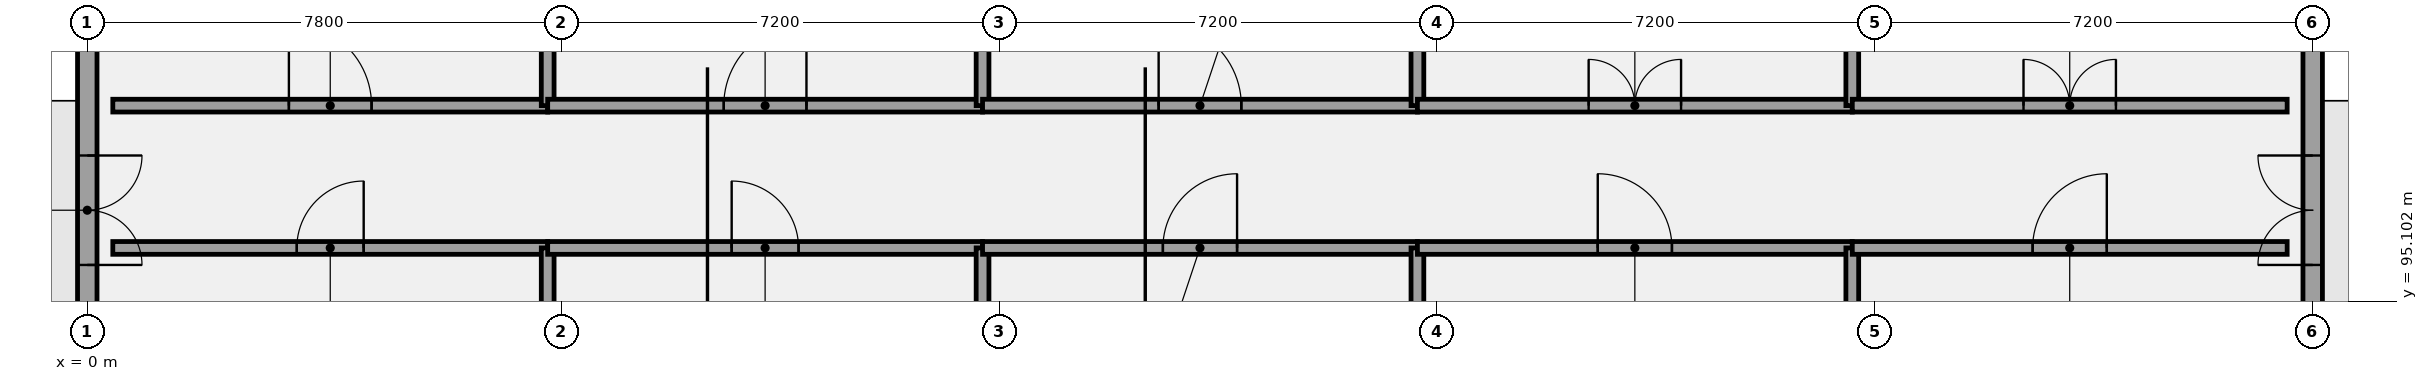
"""IFC4 building model, lengths in metres.
Left out: names, types, materials, properties, quantities, classifications, styles, units other than length and angle.
Written with IfcOpenShell. Run it as: python <this file> out.ifc"""

import sys

from ifc_helpers import new_model, si_unit, direction, frame, frame_2d, origin, place, context, subcontext, project, spatial, rectangle, extrude, element, fill, save


model = new_model("IFC4")
c1 = context("Model", 3, precision=1e-05, world=origin(), true_north=direction((0.0, 1.0)))
c2 = subcontext(c1, "Body", "Model", "MODEL_VIEW")
j1 = project(units=[si_unit("LENGTHUNIT", "METRE"), si_unit("PLANEANGLEUNIT", "RADIAN")], contexts=[c1])
p1 = place(None, origin())
s1 = spatial("IfcSite", under=j1, at=p1, CompositionType="ELEMENT")
p2 = place(p1, origin())
s2 = spatial("IfcBuilding", under=s1, at=p2, CompositionType="ELEMENT")
p3 = place(p2, origin())
s3 = spatial("IfcBuildingStorey", under=s2, at=p3, CompositionType="ELEMENT", Elevation=0.0)
p4 = place(p3, frame((36.6, 85.96, 0.0), z_axis=(0.0, 0.0, 1.0), x_axis=(0.0, 1.0, 0.0)))
e1 = element("IfcWall", 1, at=p4, inside=s3, PredefinedType="SOLIDWALL", context=c2, shape_type="SweptSolid", body=[
    extrude(rectangle(XDim=21.28, YDim=0.32, at=frame_2d((10.64, 0.0))), origin(), (0.0, 0.0, 1.0), 4.27),
])
p5 = place(p4, frame((9.74, 0.0, 0.0)))
e2 = element("IfcOpeningElement", 2, at=p5, cuts=e1, PredefinedType="OPENING", context=c2, shape_type="SweptSolid", body=[
    extrude(rectangle(XDim=1.8, YDim=2.4, at=frame_2d((0.9, 1.2))), frame((0.0, 0.17, 0.0), z_axis=(0.0, -1.0, 0.0), x_axis=(1.0, 0.0, 0.0)), (0.0, 0.0, 1.0), 0.34),
])
p6 = place(p4, frame((2.945, 0.0, 1.0)))
e3 = element("IfcOpeningElement", 3, at=p6, cuts=e1, PredefinedType="OPENING", context=c2, shape_type="SweptSolid", body=[
    extrude(rectangle(XDim=1.15, YDim=1.65, at=frame_2d((0.575, 0.825))), frame((0.0, 0.17, 0.0), z_axis=(0.0, -1.0, 0.0), x_axis=(1.0, 0.0, 0.0)), (0.0, 0.0, 1.0), 0.34),
])
p7 = place(p4, frame((17.185, 0.0, 1.0)))
e4 = element("IfcOpeningElement", 4, at=p7, cuts=e1, PredefinedType="OPENING", context=c2, shape_type="SweptSolid", body=[
    extrude(rectangle(XDim=1.15, YDim=1.65, at=frame_2d((0.575, 0.825))), frame((0.0, 0.17, 0.0), z_axis=(0.0, -1.0, 0.0), x_axis=(1.0, 0.0, 0.0)), (0.0, 0.0, 1.0), 0.34),
])
p8 = place(p3, frame((0.0, 107.24, 0.0), z_axis=(0.0, 0.0, 1.0), x_axis=(0.0, -1.0, 0.0)))
e5 = element("IfcWall", 5, at=p8, inside=s3, PredefinedType="SOLIDWALL", context=c2, shape_type="SweptSolid", body=[
    extrude(rectangle(XDim=21.28, YDim=0.32, at=frame_2d((10.64, 0.0))), origin(), (0.0, 0.0, 1.0), 4.37),
])
p9 = place(p8, frame((9.74, 0.0, 0.0)))
e6 = element("IfcOpeningElement", 6, at=p9, cuts=e5, PredefinedType="OPENING", context=c2, shape_type="SweptSolid", body=[
    extrude(rectangle(XDim=1.8, YDim=2.4, at=frame_2d((0.9, 1.2))), frame((0.0, 0.17, 0.0), z_axis=(0.0, -1.0, 0.0), x_axis=(1.0, 0.0, 0.0)), (0.0, 0.0, 1.0), 0.34),
])
p10 = place(p8, frame((17.185, 0.0, 1.0)))
e7 = element("IfcOpeningElement", 7, at=p10, cuts=e5, PredefinedType="OPENING", context=c2, shape_type="SweptSolid", body=[
    extrude(rectangle(XDim=1.15, YDim=2.15, at=frame_2d((0.575, 1.075))), frame((0.0, 0.17, 0.0), z_axis=(0.0, -1.0, 0.0), x_axis=(1.0, 0.0, 0.0)), (0.0, 0.0, 1.0), 0.34),
])
p11 = place(p8, frame((2.945, 0.0, 1.0)))
e8 = element("IfcOpeningElement", 8, at=p11, cuts=e5, PredefinedType="OPENING", context=c2, shape_type="SweptSolid", body=[
    extrude(rectangle(XDim=1.15, YDim=2.15, at=frame_2d((0.575, 1.075))), frame((0.0, 0.17, 0.0), z_axis=(0.0, -1.0, 0.0), x_axis=(1.0, 0.0, 0.0)), (0.0, 0.0, 1.0), 0.34),
])
p12 = place(p3, frame((0.42, 95.98, 0.0), z_axis=(0.0, 0.0, 1.0), x_axis=(1.0, 0.0, 0.0)))
e9 = element("IfcWall", 9, at=p12, inside=s3, PredefinedType="PARTITIONING", context=c2, shape_type="SweptSolid", body=[
    extrude(rectangle(XDim=7.152, YDim=0.21, at=frame_2d((3.576, 0.0))), origin(), (0.0, 0.0, 1.0), 5.12),
])
p13 = place(p12, frame((3.026, 0.0, 0.0)))
e10 = element("IfcOpeningElement", 10, at=p13, cuts=e9, PredefinedType="OPENING", context=c2, shape_type="SweptSolid", body=[
    extrude(rectangle(XDim=1.1, YDim=2.22, at=frame_2d((0.55, 1.11))), frame((0.0, 0.115, 0.0), z_axis=(0.0, -1.0, 0.0), x_axis=(1.0, 0.0, 0.0)), (0.0, 0.0, 1.0), 0.23),
])
p14 = place(p3, frame((7.572, 85.98, 0.0), z_axis=(0.0, 0.0, 1.0), x_axis=(0.0, 1.0, 0.0)))
e11 = element("IfcWall", 11, at=p14, inside=s3, PredefinedType="PARTITIONING", context=c2, shape_type="SweptSolid", body=[
    extrude(rectangle(XDim=10.0, YDim=0.21, at=frame_2d((5.0, 0.0))), origin(), (0.0, 0.0, 1.0), 4.52),
])
p15 = place(p3, frame((7.572, 95.98, 0.0), z_axis=(0.0, 0.0, 1.0), x_axis=(1.0, 0.0, 0.0)))
e12 = element("IfcWall", 12, at=p15, inside=s3, PredefinedType="PARTITIONING", context=c2, shape_type="SweptSolid", body=[
    extrude(rectangle(XDim=7.152, YDim=0.21, at=frame_2d((3.576, 0.0))), origin(), (0.0, 0.0, 1.0), 5.12),
])
p16 = place(p15, frame((3.026, 0.0, 0.0)))
e13 = element("IfcOpeningElement", 13, at=p16, cuts=e12, PredefinedType="OPENING", context=c2, shape_type="SweptSolid", body=[
    extrude(rectangle(XDim=1.1, YDim=2.35, at=frame_2d((0.55, 1.175))), frame((0.0, 0.115, 0.0), z_axis=(0.0, -1.0, 0.0), x_axis=(1.0, 0.0, 0.0)), (0.0, 0.0, 1.0), 0.23),
])
p17 = place(p3, frame((14.724, 85.98, 0.0), z_axis=(0.0, 0.0, 1.0), x_axis=(0.0, 1.0, 0.0)))
e14 = element("IfcWall", 14, at=p17, inside=s3, PredefinedType="PARTITIONING", context=c2, shape_type="SweptSolid", body=[
    extrude(rectangle(XDim=10.0, YDim=0.21, at=frame_2d((5.0, 0.0))), origin(), (0.0, 0.0, 1.0), 4.47),
])
p18 = place(p3, frame((14.724, 95.98, 0.0), z_axis=(0.0, 0.0, 1.0), x_axis=(1.0, 0.0, 0.0)))
e15 = element("IfcWall", 15, at=p18, inside=s3, PredefinedType="PARTITIONING", context=c2, shape_type="SweptSolid", body=[
    extrude(rectangle(XDim=7.152, YDim=0.21, at=frame_2d((3.576, 0.0))), origin(), (0.0, 0.0, 1.0), 5.12),
])
p19 = place(p18, frame((2.966, 0.0, 0.0)))
e16 = element("IfcOpeningElement", 16, at=p19, cuts=e15, PredefinedType="OPENING", context=c2, shape_type="SweptSolid", body=[
    extrude(rectangle(XDim=1.22, YDim=2.1, at=frame_2d((0.61, 1.05))), frame((0.0, 0.115, 0.0), z_axis=(0.0, -1.0, 0.0), x_axis=(1.0, 0.0, 0.0)), (0.0, 0.0, 1.0), 0.23),
])
p20 = place(p3, frame((21.876, 85.98, 0.0), z_axis=(0.0, 0.0, 1.0), x_axis=(0.0, 1.0, 0.0)))
e17 = element("IfcWall", 17, at=p20, inside=s3, PredefinedType="PARTITIONING", context=c2, shape_type="SweptSolid", body=[
    extrude(rectangle(XDim=10.0, YDim=0.21, at=frame_2d((5.0, 0.0))), origin(), (0.0, 0.0, 1.0), 4.37),
])
p21 = place(p3, frame((21.876, 95.98, 0.0), z_axis=(0.0, 0.0, 1.0), x_axis=(1.0, 0.0, 0.0)))
e18 = element("IfcWall", 18, at=p21, inside=s3, PredefinedType="PARTITIONING", context=c2, shape_type="SweptSolid", body=[
    extrude(rectangle(XDim=7.152, YDim=0.21, at=frame_2d((3.576, 0.0))), origin(), (0.0, 0.0, 1.0), 5.12),
])
p22 = place(p21, frame((2.966, 0.0, 0.0)))
e19 = element("IfcOpeningElement", 19, at=p22, cuts=e18, PredefinedType="OPENING", context=c2, shape_type="SweptSolid", body=[
    extrude(rectangle(XDim=1.22, YDim=2.22, at=frame_2d((0.61, 1.11))), frame((0.0, 0.115, 0.0), z_axis=(0.0, -1.0, 0.0), x_axis=(1.0, 0.0, 0.0)), (0.0, 0.0, 1.0), 0.23),
])
p23 = place(p3, frame((29.028, 85.98, 0.0), z_axis=(0.0, 0.0, 1.0), x_axis=(0.0, 1.0, 0.0)))
e20 = element("IfcWall", 20, at=p23, inside=s3, PredefinedType="PARTITIONING", context=c2, shape_type="SweptSolid", body=[
    extrude(rectangle(XDim=10.0, YDim=0.21, at=frame_2d((5.0, 0.0))), origin(), (0.0, 0.0, 1.0), 4.42),
])
p24 = place(p3, frame((29.028, 95.98, 0.0), z_axis=(0.0, 0.0, 1.0), x_axis=(1.0, 0.0, 0.0)))
e21 = element("IfcWall", 21, at=p24, inside=s3, PredefinedType="PARTITIONING", context=c2, shape_type="SweptSolid", body=[
    extrude(rectangle(XDim=7.152, YDim=0.21, at=frame_2d((3.576, 0.0))), origin(), (0.0, 0.0, 1.0), 5.12),
])
p25 = place(p24, frame((2.966, 0.0, 0.0)))
e22 = element("IfcOpeningElement", 22, at=p25, cuts=e21, PredefinedType="OPENING", context=c2, shape_type="SweptSolid", body=[
    extrude(rectangle(XDim=1.22, YDim=2.35, at=frame_2d((0.61, 1.175))), frame((0.0, 0.115, 0.0), z_axis=(0.0, -1.0, 0.0), x_axis=(1.0, 0.0, 0.0)), (0.0, 0.0, 1.0), 0.23),
])
p26 = place(p3, frame((0.42, 98.32, 0.0), z_axis=(0.0, 0.0, 1.0), x_axis=(1.0, 0.0, 0.0)))
e23 = element("IfcWall", 23, at=p26, inside=s3, PredefinedType="PARTITIONING", context=c2, shape_type="SweptSolid", body=[
    extrude(rectangle(XDim=7.152, YDim=0.21, at=frame_2d((3.576, 0.0))), origin(), (0.0, 0.0, 1.0), 4.57),
])
p27 = place(p26, frame((2.896, 0.0, 0.0)))
e24 = element("IfcOpeningElement", 24, at=p27, cuts=e23, PredefinedType="OPENING", context=c2, shape_type="SweptSolid", body=[
    extrude(rectangle(XDim=1.36, YDim=2.1, at=frame_2d((0.68, 1.05))), frame((0.0, 0.115, 0.0), z_axis=(0.0, -1.0, 0.0), x_axis=(1.0, 0.0, 0.0)), (0.0, 0.0, 1.0), 0.23),
])
p28 = place(p3, frame((7.572, 98.32, 0.0), z_axis=(0.0, 0.0, 1.0), x_axis=(0.0, 1.0, 0.0)))
e25 = element("IfcWall", 25, at=p28, inside=s3, PredefinedType="PARTITIONING", context=c2, shape_type="SweptSolid", body=[
    extrude(rectangle(XDim=8.9, YDim=0.21, at=frame_2d((4.45, 0.0))), origin(), (0.0, 0.0, 1.0), 4.47),
])
p29 = place(p3, frame((7.572, 98.32, 0.0), z_axis=(0.0, 0.0, 1.0), x_axis=(1.0, 0.0, 0.0)))
e26 = element("IfcWall", 26, at=p29, inside=s3, PredefinedType="PARTITIONING", context=c2, shape_type="SweptSolid", body=[
    extrude(rectangle(XDim=7.152, YDim=0.21, at=frame_2d((3.576, 0.0))), origin(), (0.0, 0.0, 1.0), 4.57),
])
p30 = place(p29, frame((2.896, 0.0, 0.0)))
e27 = element("IfcOpeningElement", 27, at=p30, cuts=e26, PredefinedType="OPENING", context=c2, shape_type="SweptSolid", body=[
    extrude(rectangle(XDim=1.36, YDim=2.22, at=frame_2d((0.68, 1.11))), frame((0.0, 0.115, 0.0), z_axis=(0.0, -1.0, 0.0), x_axis=(1.0, 0.0, 0.0)), (0.0, 0.0, 1.0), 0.23),
])
p31 = place(p3, frame((14.724, 98.32, 0.0), z_axis=(0.0, 0.0, 1.0), x_axis=(0.0, 1.0, 0.0)))
e28 = element("IfcWall", 28, at=p31, inside=s3, PredefinedType="PARTITIONING", context=c2, shape_type="SweptSolid", body=[
    extrude(rectangle(XDim=8.9, YDim=0.21, at=frame_2d((4.45, 0.0))), origin(), (0.0, 0.0, 1.0), 4.37),
])
p32 = place(p3, frame((14.724, 98.32, 0.0), z_axis=(0.0, 0.0, 1.0), x_axis=(1.0, 0.0, 0.0)))
e29 = element("IfcWall", 29, at=p32, inside=s3, PredefinedType="PARTITIONING", context=c2, shape_type="SweptSolid", body=[
    extrude(rectangle(XDim=7.152, YDim=0.21, at=frame_2d((3.576, 0.0))), origin(), (0.0, 0.0, 1.0), 4.57),
])
p33 = place(p32, frame((2.896, 0.0, 0.0)))
e30 = element("IfcOpeningElement", 30, at=p33, cuts=e29, PredefinedType="OPENING", context=c2, shape_type="SweptSolid", body=[
    extrude(rectangle(XDim=1.36, YDim=2.35, at=frame_2d((0.68, 1.175))), frame((0.0, 0.115, 0.0), z_axis=(0.0, -1.0, 0.0), x_axis=(1.0, 0.0, 0.0)), (0.0, 0.0, 1.0), 0.23),
])
p34 = place(p3, frame((21.876, 98.32, 0.0), z_axis=(0.0, 0.0, 1.0), x_axis=(0.0, 1.0, 0.0)))
e31 = element("IfcWall", 31, at=p34, inside=s3, PredefinedType="PARTITIONING", context=c2, shape_type="SweptSolid", body=[
    extrude(rectangle(XDim=8.9, YDim=0.21, at=frame_2d((4.45, 0.0))), origin(), (0.0, 0.0, 1.0), 4.37),
])
p35 = place(p3, frame((21.876, 98.32, 0.0), z_axis=(0.0, 0.0, 1.0), x_axis=(1.0, 0.0, 0.0)))
e32 = element("IfcWall", 32, at=p35, inside=s3, PredefinedType="PARTITIONING", context=c2, shape_type="SweptSolid", body=[
    extrude(rectangle(XDim=7.152, YDim=0.21, at=frame_2d((3.576, 0.0))), origin(), (0.0, 0.0, 1.0), 4.57),
])
p36 = place(p35, frame((2.816, 0.0, 0.0)))
e33 = element("IfcOpeningElement", 33, at=p36, cuts=e32, PredefinedType="OPENING", context=c2, shape_type="SweptSolid", body=[
    extrude(rectangle(XDim=1.52, YDim=2.1, at=frame_2d((0.76, 1.05))), frame((0.0, 0.115, 0.0), z_axis=(0.0, -1.0, 0.0), x_axis=(1.0, 0.0, 0.0)), (0.0, 0.0, 1.0), 0.23),
])
p37 = place(p3, frame((29.028, 98.32, 0.0), z_axis=(0.0, 0.0, 1.0), x_axis=(0.0, 1.0, 0.0)))
e34 = element("IfcWall", 34, at=p37, inside=s3, PredefinedType="PARTITIONING", context=c2, shape_type="SweptSolid", body=[
    extrude(rectangle(XDim=8.9, YDim=0.21, at=frame_2d((4.45, 0.0))), origin(), (0.0, 0.0, 1.0), 4.32),
])
p38 = place(p3, frame((29.028, 98.32, 0.0), z_axis=(0.0, 0.0, 1.0), x_axis=(1.0, 0.0, 0.0)))
e35 = element("IfcWall", 35, at=p38, inside=s3, PredefinedType="PARTITIONING", context=c2, shape_type="SweptSolid", body=[
    extrude(rectangle(XDim=7.152, YDim=0.21, at=frame_2d((3.576, 0.0))), origin(), (0.0, 0.0, 1.0), 4.57),
])
p39 = place(p38, frame((2.816, 0.0, 0.0)))
e36 = element("IfcOpeningElement", 36, at=p39, cuts=e35, PredefinedType="OPENING", context=c2, shape_type="SweptSolid", body=[
    extrude(rectangle(XDim=1.52, YDim=2.22, at=frame_2d((0.76, 1.11))), frame((0.0, 0.115, 0.0), z_axis=(0.0, -1.0, 0.0), x_axis=(1.0, 0.0, 0.0)), (0.0, 0.0, 1.0), 0.23),
])
p40 = place(p5, frame((1.8, 0.0, 0.0), z_axis=(0.0, 0.0, 1.0), x_axis=(-1.0, 0.0, 0.0)))
e37 = element("IfcDoor", 37, at=p40, inside=s3, OperationType="DOUBLE_DOOR_SINGLE_SWING", PredefinedType="DOOR", context=c2, shape_type="SweptSolid", body=[
    extrude(rectangle(XDim=1.8, YDim=2.4, at=frame_2d((0.9, 1.2))), frame((0.0, 0.025, 0.0), z_axis=(0.0, -1.0, 0.0), x_axis=(1.0, 0.0, 0.0)), (0.0, 0.0, 1.0), 0.05),
])
fill(e2, e37)
p41 = place(p9, frame((1.8, 0.0, 0.0), z_axis=(0.0, 0.0, 1.0), x_axis=(-1.0, 0.0, 0.0)))
e38 = element("IfcDoor", 38, at=p41, inside=s3, OperationType="DOUBLE_DOOR_SINGLE_SWING", PredefinedType="DOOR", context=c2, shape_type="SweptSolid", body=[
    extrude(rectangle(XDim=1.8, YDim=2.4, at=frame_2d((0.9, 1.2))), frame((0.0, 0.025, 0.0), z_axis=(0.0, -1.0, 0.0), x_axis=(1.0, 0.0, 0.0)), (0.0, 0.0, 1.0), 0.05),
])
fill(e6, e38)
p42 = place(p13, frame((1.1, 0.0, 0.0), z_axis=(0.0, 0.0, 1.0), x_axis=(-1.0, 0.0, 0.0)))
e39 = element("IfcDoor", 39, at=p42, inside=s3, OperationType="SINGLE_SWING_RIGHT", PredefinedType="DOOR", context=c2, shape_type="SweptSolid", body=[
    extrude(rectangle(XDim=1.1, YDim=2.22, at=frame_2d((0.55, 1.11))), frame((0.0, 0.025, 0.0), z_axis=(0.0, -1.0, 0.0), x_axis=(1.0, 0.0, 0.0)), (0.0, 0.0, 1.0), 0.05),
])
fill(e10, e39)
p43 = place(p16, frame((1.1, 0.0, 0.0), z_axis=(0.0, 0.0, 1.0), x_axis=(-1.0, 0.0, 0.0)))
e40 = element("IfcDoor", 40, at=p43, inside=s3, OperationType="SINGLE_SWING_LEFT", PredefinedType="DOOR", context=c2, shape_type="SweptSolid", body=[
    extrude(rectangle(XDim=1.1, YDim=2.35, at=frame_2d((0.55, 1.175))), frame((0.0, 0.025, 0.0), z_axis=(0.0, -1.0, 0.0), x_axis=(1.0, 0.0, 0.0)), (0.0, 0.0, 1.0), 0.05),
])
fill(e13, e40)
p44 = place(p19, frame((1.22, 0.0, 0.0), z_axis=(0.0, 0.0, 1.0), x_axis=(-1.0, 0.0, 0.0)))
e41 = element("IfcDoor", 41, at=p44, inside=s3, OperationType="SINGLE_SWING_RIGHT", PredefinedType="DOOR", context=c2, shape_type="SweptSolid", body=[
    extrude(rectangle(XDim=1.22, YDim=2.1, at=frame_2d((0.61, 1.05))), frame((0.0, 0.025, 0.0), z_axis=(0.0, -1.0, 0.0), x_axis=(1.0, 0.0, 0.0)), (0.0, 0.0, 1.0), 0.05),
])
fill(e16, e41)
p45 = place(p22, frame((1.22, 0.0, 0.0), z_axis=(0.0, 0.0, 1.0), x_axis=(-1.0, 0.0, 0.0)))
e42 = element("IfcDoor", 42, at=p45, inside=s3, OperationType="SINGLE_SWING_LEFT", PredefinedType="DOOR", context=c2, shape_type="SweptSolid", body=[
    extrude(rectangle(XDim=1.22, YDim=2.22, at=frame_2d((0.61, 1.11))), frame((0.0, 0.025, 0.0), z_axis=(0.0, -1.0, 0.0), x_axis=(1.0, 0.0, 0.0)), (0.0, 0.0, 1.0), 0.05),
])
fill(e19, e42)
p46 = place(p25, frame((1.22, 0.0, 0.0), z_axis=(0.0, 0.0, 1.0), x_axis=(-1.0, 0.0, 0.0)))
e43 = element("IfcDoor", 43, at=p46, inside=s3, OperationType="SINGLE_SWING_RIGHT", PredefinedType="DOOR", context=c2, shape_type="SweptSolid", body=[
    extrude(rectangle(XDim=1.22, YDim=2.35, at=frame_2d((0.61, 1.175))), frame((0.0, 0.025, 0.0), z_axis=(0.0, -1.0, 0.0), x_axis=(1.0, 0.0, 0.0)), (0.0, 0.0, 1.0), 0.05),
])
fill(e22, e43)
p47 = place(p27, origin())
e44 = element("IfcDoor", 44, at=p47, inside=s3, OperationType="SINGLE_SWING_LEFT", PredefinedType="DOOR", context=c2, shape_type="SweptSolid", body=[
    extrude(rectangle(XDim=1.36, YDim=2.1, at=frame_2d((0.68, 1.05))), frame((0.0, 0.025, 0.0), z_axis=(0.0, -1.0, 0.0), x_axis=(1.0, 0.0, 0.0)), (0.0, 0.0, 1.0), 0.05),
])
fill(e24, e44)
p48 = place(p30, origin())
e45 = element("IfcDoor", 45, at=p48, inside=s3, OperationType="SINGLE_SWING_RIGHT", PredefinedType="DOOR", context=c2, shape_type="SweptSolid", body=[
    extrude(rectangle(XDim=1.36, YDim=2.22, at=frame_2d((0.68, 1.11))), frame((0.0, 0.025, 0.0), z_axis=(0.0, -1.0, 0.0), x_axis=(1.0, 0.0, 0.0)), (0.0, 0.0, 1.0), 0.05),
])
fill(e27, e45)
p49 = place(p33, origin())
e46 = element("IfcDoor", 46, at=p49, inside=s3, OperationType="SINGLE_SWING_LEFT", PredefinedType="DOOR", context=c2, shape_type="SweptSolid", body=[
    extrude(rectangle(XDim=1.36, YDim=2.35, at=frame_2d((0.68, 1.175))), frame((0.0, 0.025, 0.0), z_axis=(0.0, -1.0, 0.0), x_axis=(1.0, 0.0, 0.0)), (0.0, 0.0, 1.0), 0.05),
])
fill(e30, e46)
p50 = place(p36, origin())
e47 = element("IfcDoor", 47, at=p50, inside=s3, OperationType="DOUBLE_DOOR_SINGLE_SWING", PredefinedType="DOOR", context=c2, shape_type="SweptSolid", body=[
    extrude(rectangle(XDim=1.52, YDim=2.1, at=frame_2d((0.76, 1.05))), frame((0.0, 0.025, 0.0), z_axis=(0.0, -1.0, 0.0), x_axis=(1.0, 0.0, 0.0)), (0.0, 0.0, 1.0), 0.05),
])
fill(e33, e47)
p51 = place(p39, origin())
e48 = element("IfcDoor", 48, at=p51, inside=s3, OperationType="DOUBLE_DOOR_SINGLE_SWING", PredefinedType="DOOR", context=c2, shape_type="SweptSolid", body=[
    extrude(rectangle(XDim=1.52, YDim=2.22, at=frame_2d((0.76, 1.11))), frame((0.0, 0.025, 0.0), z_axis=(0.0, -1.0, 0.0), x_axis=(1.0, 0.0, 0.0)), (0.0, 0.0, 1.0), 0.05),
])
fill(e36, e48)
save(model, sys.argv[1])
